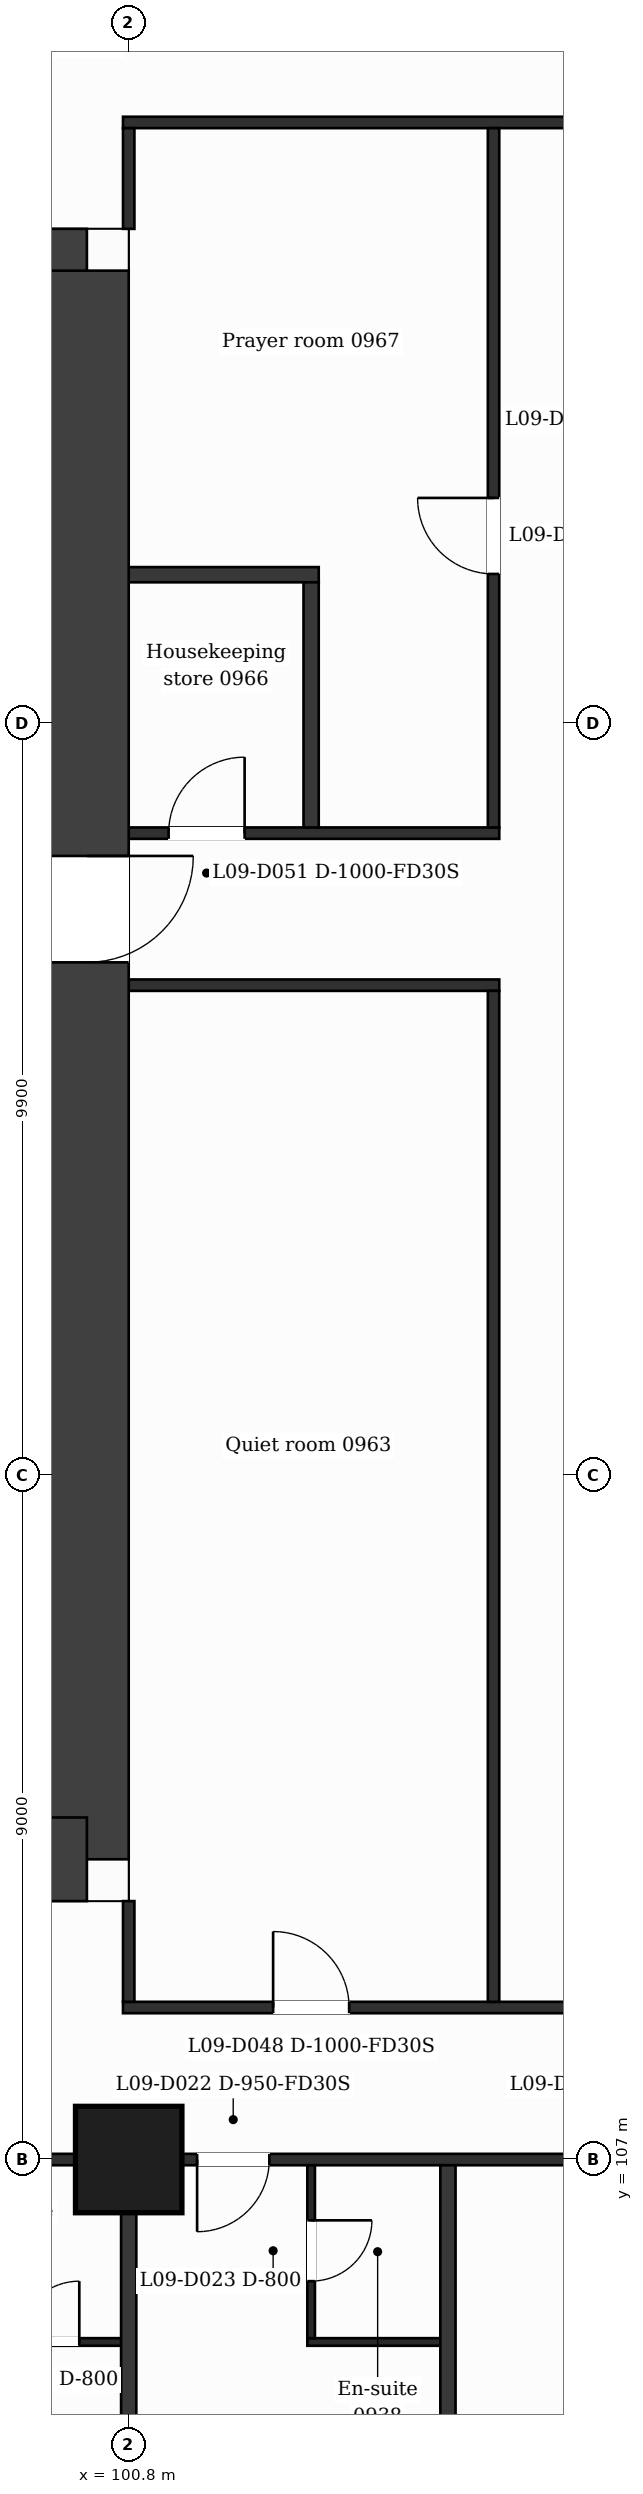
"""IFC4 building model, lengths in metres.
Left out: names, types, materials, properties, quantities, classifications, styles, units other than length and angle.
Written with IfcOpenShell. Run it as: python <this file> out.ifc"""

import sys

from ifc_helpers import new_model, si_unit, direction, frame, frame_2d, origin, origin_2d, place, context, subcontext, project, spatial, rectangle, extrude, element, fill, save


model = new_model("IFC4")
c1 = context("Model", 3, precision=1e-05, world=origin(), true_north=direction((0.0, 1.0)))
c2 = subcontext(c1, "Body", "Model", "MODEL_VIEW")
j1 = project(units=[si_unit("LENGTHUNIT", "METRE"), si_unit("PLANEANGLEUNIT", "RADIAN")], contexts=[c1])
p1 = place(None, origin())
s1 = spatial("IfcSite", under=j1, at=p1, CompositionType="ELEMENT")
p2 = place(p1, origin())
s2 = spatial("IfcBuilding", under=s1, at=p2, CompositionType="ELEMENT")
p3 = place(p2, frame((0.0, 0.0, 49.5)))
s3 = spatial("IfcBuildingStorey", under=s2, at=p3, CompositionType="ELEMENT", Elevation=49.5)
p4 = place(p3, frame((89.112, 131.85, 0.0), z_axis=(0.0, 0.0, 1.0), x_axis=(1.0, 0.0, 0.0)))
e1 = element("IfcWall", 1, at=p4, inside=s3, PredefinedType="SHEAR", context=c2, shape_type="SweptSolid", body=[
    extrude(rectangle(XDim=11.138, YDim=1.1, at=frame_2d((5.569, 0.0))), origin(), (0.0, 0.0, 1.0), 3.5),
])
p5 = place(p4, frame((6.552, 0.0, 0.0)))
e2 = element("IfcOpeningElement", 2, at=p5, cuts=e1, PredefinedType="OPENING", context=c2, shape_type="SweptSolid", body=[
    extrude(rectangle(XDim=1.2, YDim=2.1, at=frame_2d((0.6, 1.05))), frame((0.0, 0.56, 0.0), z_axis=(0.0, -1.0, 0.0), x_axis=(1.0, 0.0, 0.0)), (0.0, 0.0, 1.0), 1.12),
])
p6 = place(p3, frame((100.25, 131.85, 0.0), z_axis=(0.0, 0.0, 1.0), x_axis=(0.0, -1.0, 0.0)))
e3 = element("IfcWall", 3, at=p6, inside=s3, PredefinedType="SHEAR", context=c2, shape_type="SweptSolid", body=[
    extrude(rectangle(XDim=20.9, YDim=1.1, at=frame_2d((10.45, 0.0))), origin(), (0.0, 0.0, 1.0), 3.5),
])
p7 = place(p6, frame((7.7, 0.0, 0.0)))
e4 = element("IfcOpeningElement", 4, at=p7, cuts=e3, PredefinedType="OPENING", context=c2, shape_type="SweptSolid", body=[
    extrude(rectangle(XDim=1.4, YDim=2.1, at=frame_2d((0.7, 1.05))), frame((0.0, 0.56, 0.0), z_axis=(0.0, -1.0, 0.0), x_axis=(1.0, 0.0, 0.0)), (0.0, 0.0, 1.0), 1.12),
])
p8 = place(p3, frame((100.25, 110.95, 0.0), z_axis=(0.0, 0.0, 1.0), x_axis=(-1.0, 0.0, 0.0)))
e5 = element("IfcWall", 5, at=p8, inside=s3, PredefinedType="SHEAR", context=c2, shape_type="SweptSolid", body=[
    extrude(rectangle(XDim=13.952, YDim=1.1, at=frame_2d((6.976, 0.0))), origin(), (0.0, 0.0, 1.0), 3.5),
])
p9 = place(p8, frame((5.748, 0.0, 0.0)))
e6 = element("IfcOpeningElement", 6, at=p9, cuts=e5, PredefinedType="OPENING", context=c2, shape_type="SweptSolid", body=[
    extrude(rectangle(XDim=1.4, YDim=2.1, at=frame_2d((0.7, 1.05))), frame((0.0, 0.56, 0.0), z_axis=(0.0, -1.0, 0.0), x_axis=(1.0, 0.0, 0.0)), (0.0, 0.0, 1.0), 1.12),
])
p10 = place(p3, frame((100.8, 107.0, 0.0), z_axis=(0.0, 0.0, 1.0), x_axis=(1.0, 0.0, 0.0)))
e7 = element("IfcColumn", 7, at=p10, inside=s3, PredefinedType="COLUMN", context=c2, shape_type="SweptSolid", body=[
    extrude(rectangle(XDim=1.4, YDim=1.4, at=origin_2d()), origin(), (0.0, 0.0, 1.0), 3.5),
])
p11 = place(p3, frame((98.05, 104.6, 0.0), z_axis=(0.0, 0.0, 1.0), x_axis=(1.0, 0.0, 0.0)))
e8 = element("IfcWall", 8, at=p11, inside=s3, PredefinedType="PARTITIONING", context=c2, shape_type="SweptSolid", body=[
    extrude(rectangle(XDim=2.75, YDim=0.1, at=frame_2d((1.375, 0.0))), origin(), (0.0, 0.0, 1.0), 3.18),
])
p12 = place(p11, frame((1.3, 0.0, 0.0)))
e9 = element("IfcOpeningElement", 9, at=p12, cuts=e8, PredefinedType="OPENING", context=c2, shape_type="SweptSolid", body=[
    extrude(rectangle(XDim=0.8, YDim=2.1, at=frame_2d((0.4, 1.05))), frame((0.0, 0.06, 0.0), z_axis=(0.0, -1.0, 0.0), x_axis=(1.0, 0.0, 0.0)), (0.0, 0.0, 1.0), 0.12),
])
p13 = place(p3, frame((103.15, 104.6, 0.0), z_axis=(0.0, 0.0, 1.0), x_axis=(1.0, 0.0, 0.0)))
e10 = element("IfcWall", 10, at=p13, inside=s3, PredefinedType="PARTITIONING", context=c2, shape_type="SweptSolid", body=[
    extrude(rectangle(XDim=1.85, YDim=0.1, at=frame_2d((0.925, 0.0))), origin(), (0.0, 0.0, 1.0), 3.18),
])
p14 = place(p3, frame((87.018, 107.0, 0.0), z_axis=(0.0, 0.0, 1.0), x_axis=(1.0, 0.0, 0.0)))
e11 = element("IfcWall", 11, at=p14, inside=s3, PredefinedType="PARTITIONING", context=c2, shape_type="SweptSolid", body=[
    extrude(rectangle(XDim=52.765, YDim=0.15, at=frame_2d((26.382, 0.0))), origin(), (0.0, 0.0, 1.0), 3.18),
])
p15 = place(p14, frame((0.87, 0.0, 0.0)))
e12 = element("IfcOpeningElement", 12, at=p15, cuts=e11, PredefinedType="OPENING", context=c2, shape_type="SweptSolid", body=[
    extrude(rectangle(XDim=0.95, YDim=2.1, at=frame_2d((0.475, 1.05))), frame((0.0, 0.085, 0.0), z_axis=(0.0, -1.0, 0.0), x_axis=(1.0, 0.0, 0.0)), (0.0, 0.0, 1.0), 0.17),
])
p16 = place(p14, frame((6.752, 0.0, 0.0)))
e13 = element("IfcOpeningElement", 13, at=p16, cuts=e11, PredefinedType="OPENING", context=c2, shape_type="SweptSolid", body=[
    extrude(rectangle(XDim=0.95, YDim=2.1, at=frame_2d((0.475, 1.05))), frame((0.0, 0.085, 0.0), z_axis=(0.0, -1.0, 0.0), x_axis=(1.0, 0.0, 0.0)), (0.0, 0.0, 1.0), 0.17),
])
p17 = place(p14, frame((9.857, 0.0, 0.0)))
e14 = element("IfcOpeningElement", 14, at=p17, cuts=e11, PredefinedType="OPENING", context=c2, shape_type="SweptSolid", body=[
    extrude(rectangle(XDim=0.95, YDim=2.1, at=frame_2d((0.475, 1.05))), frame((0.0, 0.085, 0.0), z_axis=(0.0, -1.0, 0.0), x_axis=(1.0, 0.0, 0.0)), (0.0, 0.0, 1.0), 0.17),
])
p18 = place(p14, frame((14.682, 0.0, 0.0)))
e15 = element("IfcOpeningElement", 15, at=p18, cuts=e11, PredefinedType="OPENING", context=c2, shape_type="SweptSolid", body=[
    extrude(rectangle(XDim=0.95, YDim=2.1, at=frame_2d((0.475, 1.05))), frame((0.0, 0.085, 0.0), z_axis=(0.0, -1.0, 0.0), x_axis=(1.0, 0.0, 0.0)), (0.0, 0.0, 1.0), 0.17),
])
p19 = place(p14, frame((19.862, 0.0, 0.0)))
e16 = element("IfcOpeningElement", 16, at=p19, cuts=e11, PredefinedType="OPENING", context=c2, shape_type="SweptSolid", body=[
    extrude(rectangle(XDim=0.95, YDim=2.1, at=frame_2d((0.475, 1.05))), frame((0.0, 0.085, 0.0), z_axis=(0.0, -1.0, 0.0), x_axis=(1.0, 0.0, 0.0)), (0.0, 0.0, 1.0), 0.17),
])
p20 = place(p14, frame((25.157, 0.0, 0.0)))
e17 = element("IfcOpeningElement", 17, at=p20, cuts=e11, PredefinedType="OPENING", context=c2, shape_type="SweptSolid", body=[
    extrude(rectangle(XDim=0.95, YDim=2.1, at=frame_2d((0.475, 1.05))), frame((0.0, 0.085, 0.0), z_axis=(0.0, -1.0, 0.0), x_axis=(1.0, 0.0, 0.0)), (0.0, 0.0, 1.0), 0.17),
])
p21 = place(p14, frame((28.262, 0.0, 0.0)))
e18 = element("IfcOpeningElement", 18, at=p21, cuts=e11, PredefinedType="OPENING", context=c2, shape_type="SweptSolid", body=[
    extrude(rectangle(XDim=0.95, YDim=2.1, at=frame_2d((0.475, 1.05))), frame((0.0, 0.085, 0.0), z_axis=(0.0, -1.0, 0.0), x_axis=(1.0, 0.0, 0.0)), (0.0, 0.0, 1.0), 0.17),
])
p22 = place(p14, frame((32.207, 0.0, 0.0)))
e19 = element("IfcOpeningElement", 19, at=p22, cuts=e11, PredefinedType="OPENING", context=c2, shape_type="SweptSolid", body=[
    extrude(rectangle(XDim=0.95, YDim=2.1, at=frame_2d((0.475, 1.05))), frame((0.0, 0.085, 0.0), z_axis=(0.0, -1.0, 0.0), x_axis=(1.0, 0.0, 0.0)), (0.0, 0.0, 1.0), 0.17),
])
p23 = place(p14, frame((37.094, 0.0, 0.0)))
e20 = element("IfcOpeningElement", 20, at=p23, cuts=e11, PredefinedType="OPENING", context=c2, shape_type="SweptSolid", body=[
    extrude(rectangle(XDim=0.95, YDim=2.1, at=frame_2d((0.475, 1.05))), frame((0.0, 0.085, 0.0), z_axis=(0.0, -1.0, 0.0), x_axis=(1.0, 0.0, 0.0)), (0.0, 0.0, 1.0), 0.17),
])
p24 = place(p14, frame((43.045, 0.0, 0.0)))
e21 = element("IfcOpeningElement", 21, at=p24, cuts=e11, PredefinedType="OPENING", context=c2, shape_type="SweptSolid", body=[
    extrude(rectangle(XDim=0.95, YDim=2.1, at=frame_2d((0.475, 1.05))), frame((0.0, 0.085, 0.0), z_axis=(0.0, -1.0, 0.0), x_axis=(1.0, 0.0, 0.0)), (0.0, 0.0, 1.0), 0.17),
])
p25 = place(p14, frame((49.285, 0.0, 0.0)))
e22 = element("IfcOpeningElement", 22, at=p25, cuts=e11, PredefinedType="OPENING", context=c2, shape_type="SweptSolid", body=[
    extrude(rectangle(XDim=0.95, YDim=2.1, at=frame_2d((0.475, 1.05))), frame((0.0, 0.085, 0.0), z_axis=(0.0, -1.0, 0.0), x_axis=(1.0, 0.0, 0.0)), (0.0, 0.0, 1.0), 0.17),
])
p26 = place(p3, frame((100.725, 109.0, 0.0), z_axis=(0.0, 0.0, 1.0), x_axis=(1.0, 0.0, 0.0)))
e23 = element("IfcWall", 23, at=p26, inside=s3, PredefinedType="PARTITIONING", context=c2, shape_type="SweptSolid", body=[
    extrude(rectangle(XDim=25.35, YDim=0.15, at=frame_2d((12.675, 0.0))), origin(), (0.0, 0.0, 1.0), 3.18),
])
p27 = place(p26, frame((1.975, 0.0, 0.0)))
e24 = element("IfcOpeningElement", 24, at=p27, cuts=e23, PredefinedType="OPENING", context=c2, shape_type="SweptSolid", body=[
    extrude(rectangle(XDim=1.0, YDim=2.1, at=frame_2d((0.5, 1.05))), frame((0.0, 0.085, 0.0), z_axis=(0.0, -1.0, 0.0), x_axis=(1.0, 0.0, 0.0)), (0.0, 0.0, 1.0), 0.17),
])
p28 = place(p26, frame((11.505, 0.0, 0.0)))
e25 = element("IfcOpeningElement", 25, at=p28, cuts=e23, PredefinedType="OPENING", context=c2, shape_type="SweptSolid", body=[
    extrude(rectangle(XDim=1.0, YDim=2.1, at=frame_2d((0.5, 1.05))), frame((0.0, 0.085, 0.0), z_axis=(0.0, -1.0, 0.0), x_axis=(1.0, 0.0, 0.0)), (0.0, 0.0, 1.0), 0.17),
])
p29 = place(p26, frame((22.065, 0.0, 0.0)))
e26 = element("IfcOpeningElement", 26, at=p29, cuts=e23, PredefinedType="OPENING", context=c2, shape_type="SweptSolid", body=[
    extrude(rectangle(XDim=1.0, YDim=2.1, at=frame_2d((0.5, 1.05))), frame((0.0, 0.085, 0.0), z_axis=(0.0, -1.0, 0.0), x_axis=(1.0, 0.0, 0.0)), (0.0, 0.0, 1.0), 0.17),
])
p30 = place(p3, frame((100.8, 122.45, 0.0), z_axis=(0.0, 0.0, 1.0), x_axis=(1.0, 0.0, 0.0)))
e27 = element("IfcWall", 27, at=p30, inside=s3, PredefinedType="PARTITIONING", context=c2, shape_type="SweptSolid", body=[
    extrude(rectangle(XDim=4.875, YDim=0.15, at=frame_2d((2.438, 0.0))), origin(), (0.0, 0.0, 1.0), 3.18),
])
p31 = place(p3, frame((100.8, 124.45, 0.0), z_axis=(0.0, 0.0, 1.0), x_axis=(1.0, 0.0, 0.0)))
e28 = element("IfcWall", 28, at=p31, inside=s3, PredefinedType="PARTITIONING", context=c2, shape_type="SweptSolid", body=[
    extrude(rectangle(XDim=4.875, YDim=0.15, at=frame_2d((2.438, 0.0))), origin(), (0.0, 0.0, 1.0), 3.18),
])
p32 = place(p31, frame((0.525, 0.0, 0.0)))
e29 = element("IfcOpeningElement", 29, at=p32, cuts=e28, PredefinedType="OPENING", context=c2, shape_type="SweptSolid", body=[
    extrude(rectangle(XDim=1.0, YDim=2.1, at=frame_2d((0.5, 1.05))), frame((0.0, 0.085, 0.0), z_axis=(0.0, -1.0, 0.0), x_axis=(1.0, 0.0, 0.0)), (0.0, 0.0, 1.0), 0.17),
])
p33 = place(p3, frame((100.8, 127.85, 0.0), z_axis=(0.0, 0.0, 1.0), x_axis=(1.0, 0.0, 0.0)))
e30 = element("IfcWall", 30, at=p33, inside=s3, PredefinedType="PARTITIONING", context=c2, shape_type="SweptSolid", body=[
    extrude(rectangle(XDim=2.5, YDim=0.2, at=frame_2d((1.25, 0.0))), origin(), (0.0, 0.0, 1.0), 3.18),
])
p34 = place(p3, frame((100.725, 133.8, 0.0), z_axis=(0.0, 0.0, 1.0), x_axis=(1.0, 0.0, 0.0)))
e31 = element("IfcWall", 31, at=p34, inside=s3, PredefinedType="PARTITIONING", context=c2, shape_type="SweptSolid", body=[
    extrude(rectangle(XDim=25.35, YDim=0.15, at=frame_2d((12.675, 0.0))), origin(), (0.0, 0.0, 1.0), 3.18),
])
p35 = place(p3, frame((100.8, 99.79, 0.0), z_axis=(0.0, 0.0, 1.0), x_axis=(0.0, 1.0, 0.0)))
e32 = element("IfcWall", 32, at=p35, inside=s3, PredefinedType="PARTITIONING", context=c2, shape_type="SweptSolid", body=[
    extrude(rectangle(XDim=7.135, YDim=0.2, at=frame_2d((3.567, 0.0))), origin(), (0.0, 0.0, 1.0), 3.18),
])
p36 = place(p3, frame((100.8, 109.075, 0.0), z_axis=(0.0, 0.0, 1.0), x_axis=(0.0, 1.0, 0.0)))
e33 = element("IfcWall", 33, at=p36, inside=s3, PredefinedType="PARTITIONING", context=c2, shape_type="SweptSolid", body=[
    extrude(rectangle(XDim=1.325, YDim=0.15, at=frame_2d((0.663, 0.0))), origin(), (0.0, 0.0, 1.0), 3.18),
])
p37 = place(p3, frame((100.8, 132.4, 0.0), z_axis=(0.0, 0.0, 1.0), x_axis=(0.0, 1.0, 0.0)))
e34 = element("IfcWall", 34, at=p37, inside=s3, PredefinedType="PARTITIONING", context=c2, shape_type="SweptSolid", body=[
    extrude(rectangle(XDim=1.325, YDim=0.15, at=frame_2d((0.663, 0.0))), origin(), (0.0, 0.0, 1.0), 3.18),
])
p38 = place(p3, frame((103.2, 104.65, 0.0), z_axis=(0.0, 0.0, 1.0), x_axis=(0.0, 1.0, 0.0)))
e35 = element("IfcWall", 35, at=p38, inside=s3, PredefinedType="PARTITIONING", context=c2, shape_type="SweptSolid", body=[
    extrude(rectangle(XDim=2.275, YDim=0.1, at=frame_2d((1.138, 0.0))), origin(), (0.0, 0.0, 1.0), 3.18),
])
p39 = place(p38, frame((0.75, 0.0, 0.0)))
e36 = element("IfcOpeningElement", 36, at=p39, cuts=e35, PredefinedType="OPENING", context=c2, shape_type="SweptSolid", body=[
    extrude(rectangle(XDim=0.8, YDim=2.1, at=frame_2d((0.4, 1.05))), frame((0.0, 0.06, 0.0), z_axis=(0.0, -1.0, 0.0), x_axis=(1.0, 0.0, 0.0)), (0.0, 0.0, 1.0), 0.12),
])
p40 = place(p3, frame((103.2, 124.525, 0.0), z_axis=(0.0, 0.0, 1.0), x_axis=(0.0, 1.0, 0.0)))
e37 = element("IfcWall", 37, at=p40, inside=s3, PredefinedType="PARTITIONING", context=c2, shape_type="SweptSolid", body=[
    extrude(rectangle(XDim=3.225, YDim=0.2, at=frame_2d((1.613, 0.0))), origin(), (0.0, 0.0, 1.0), 3.18),
])
p41 = place(p3, frame((105.0, 99.79, 0.0), z_axis=(0.0, 0.0, 1.0), x_axis=(0.0, 1.0, 0.0)))
e38 = element("IfcWall", 38, at=p41, inside=s3, PredefinedType="PARTITIONING", context=c2, shape_type="SweptSolid", body=[
    extrude(rectangle(XDim=7.135, YDim=0.2, at=frame_2d((3.567, 0.0))), origin(), (0.0, 0.0, 1.0), 3.18),
])
p42 = place(p3, frame((105.6, 109.075, 0.0), z_axis=(0.0, 0.0, 1.0), x_axis=(0.0, 1.0, 0.0)))
e39 = element("IfcWall", 39, at=p42, inside=s3, PredefinedType="PARTITIONING", context=c2, shape_type="SweptSolid", body=[
    extrude(rectangle(XDim=13.3, YDim=0.15, at=frame_2d((6.65, 0.0))), origin(), (0.0, 0.0, 1.0), 3.18),
])
p43 = place(p3, frame((105.6, 124.525, 0.0), z_axis=(0.0, 0.0, 1.0), x_axis=(0.0, 1.0, 0.0)))
e40 = element("IfcWall", 40, at=p43, inside=s3, PredefinedType="PARTITIONING", context=c2, shape_type="SweptSolid", body=[
    extrude(rectangle(XDim=9.2, YDim=0.15, at=frame_2d((4.6, 0.0))), origin(), (0.0, 0.0, 1.0), 3.18),
])
p44 = place(p43, frame((3.335, 0.0, 0.0)))
e41 = element("IfcOpeningElement", 41, at=p44, cuts=e40, PredefinedType="OPENING", context=c2, shape_type="SweptSolid", body=[
    extrude(rectangle(XDim=1.0, YDim=2.1, at=frame_2d((0.5, 1.05))), frame((0.0, 0.085, 0.0), z_axis=(0.0, -1.0, 0.0), x_axis=(1.0, 0.0, 0.0)), (0.0, 0.0, 1.0), 0.17),
])
p45 = place(p12, origin())
e42 = element("IfcDoor", 42, at=p45, inside=s3, OperationType="SINGLE_SWING_RIGHT", PredefinedType="DOOR", context=c2, shape_type="SweptSolid", body=[
    extrude(rectangle(XDim=0.8, YDim=2.1, at=frame_2d((0.4, 1.05))), frame((0.0, 0.025, 0.0), z_axis=(0.0, -1.0, 0.0), x_axis=(1.0, 0.0, 0.0)), (0.0, 0.0, 1.0), 0.05),
])
fill(e9, e42)
p46 = place(p18, origin())
e43 = element("IfcDoor", 43, at=p46, inside=s3, OperationType="SINGLE_SWING_LEFT", PredefinedType="DOOR", context=c2, shape_type="SweptSolid", body=[
    extrude(rectangle(XDim=0.95, YDim=2.1, at=frame_2d((0.475, 1.05))), frame((0.0, 0.025, 0.0), z_axis=(0.0, -1.0, 0.0), x_axis=(1.0, 0.0, 0.0)), (0.0, 0.0, 1.0), 0.05),
])
fill(e15, e43)
p47 = place(p39, origin())
e44 = element("IfcDoor", 44, at=p47, inside=s3, OperationType="SINGLE_SWING_RIGHT", PredefinedType="DOOR", context=c2, shape_type="SweptSolid", body=[
    extrude(rectangle(XDim=0.8, YDim=2.1, at=frame_2d((0.4, 1.05))), frame((0.0, 0.025, 0.0), z_axis=(0.0, -1.0, 0.0), x_axis=(1.0, 0.0, 0.0)), (0.0, 0.0, 1.0), 0.05),
])
fill(e36, e44)
p48 = place(p44, origin())
e45 = element("IfcDoor", 45, at=p48, inside=s3, OperationType="SINGLE_SWING_RIGHT", PredefinedType="DOOR", context=c2, shape_type="SweptSolid", body=[
    extrude(rectangle(XDim=1.0, YDim=2.1, at=frame_2d((0.5, 1.05))), frame((0.0, 0.025, 0.0), z_axis=(0.0, -1.0, 0.0), x_axis=(1.0, 0.0, 0.0)), (0.0, 0.0, 1.0), 0.05),
])
fill(e41, e45)
p49 = place(p27, origin())
e46 = element("IfcDoor", 46, at=p49, inside=s3, OperationType="SINGLE_SWING_LEFT", PredefinedType="DOOR", context=c2, shape_type="SweptSolid", body=[
    extrude(rectangle(XDim=1.0, YDim=2.1, at=frame_2d((0.5, 1.05))), frame((0.0, 0.025, 0.0), z_axis=(0.0, -1.0, 0.0), x_axis=(1.0, 0.0, 0.0)), (0.0, 0.0, 1.0), 0.05),
])
fill(e24, e46)
p50 = place(p32, origin())
e47 = element("IfcDoor", 47, at=p50, inside=s3, OperationType="SINGLE_SWING_RIGHT", PredefinedType="DOOR", context=c2, shape_type="SweptSolid", body=[
    extrude(rectangle(XDim=1.0, YDim=2.1, at=frame_2d((0.5, 1.05))), frame((0.0, 0.025, 0.0), z_axis=(0.0, -1.0, 0.0), x_axis=(1.0, 0.0, 0.0)), (0.0, 0.0, 1.0), 0.05),
])
fill(e29, e47)
p51 = place(p7, origin())
e48 = element("IfcDoor", 48, at=p51, inside=s3, OperationType="SINGLE_SWING_LEFT", PredefinedType="DOOR", context=c2, shape_type="SweptSolid", body=[
    extrude(rectangle(XDim=1.4, YDim=2.1, at=frame_2d((0.7, 1.05))), frame((0.0, 0.025, 0.0), z_axis=(0.0, -1.0, 0.0), x_axis=(1.0, 0.0, 0.0)), (0.0, 0.0, 1.0), 0.05),
])
fill(e4, e48)
save(model, sys.argv[1])
